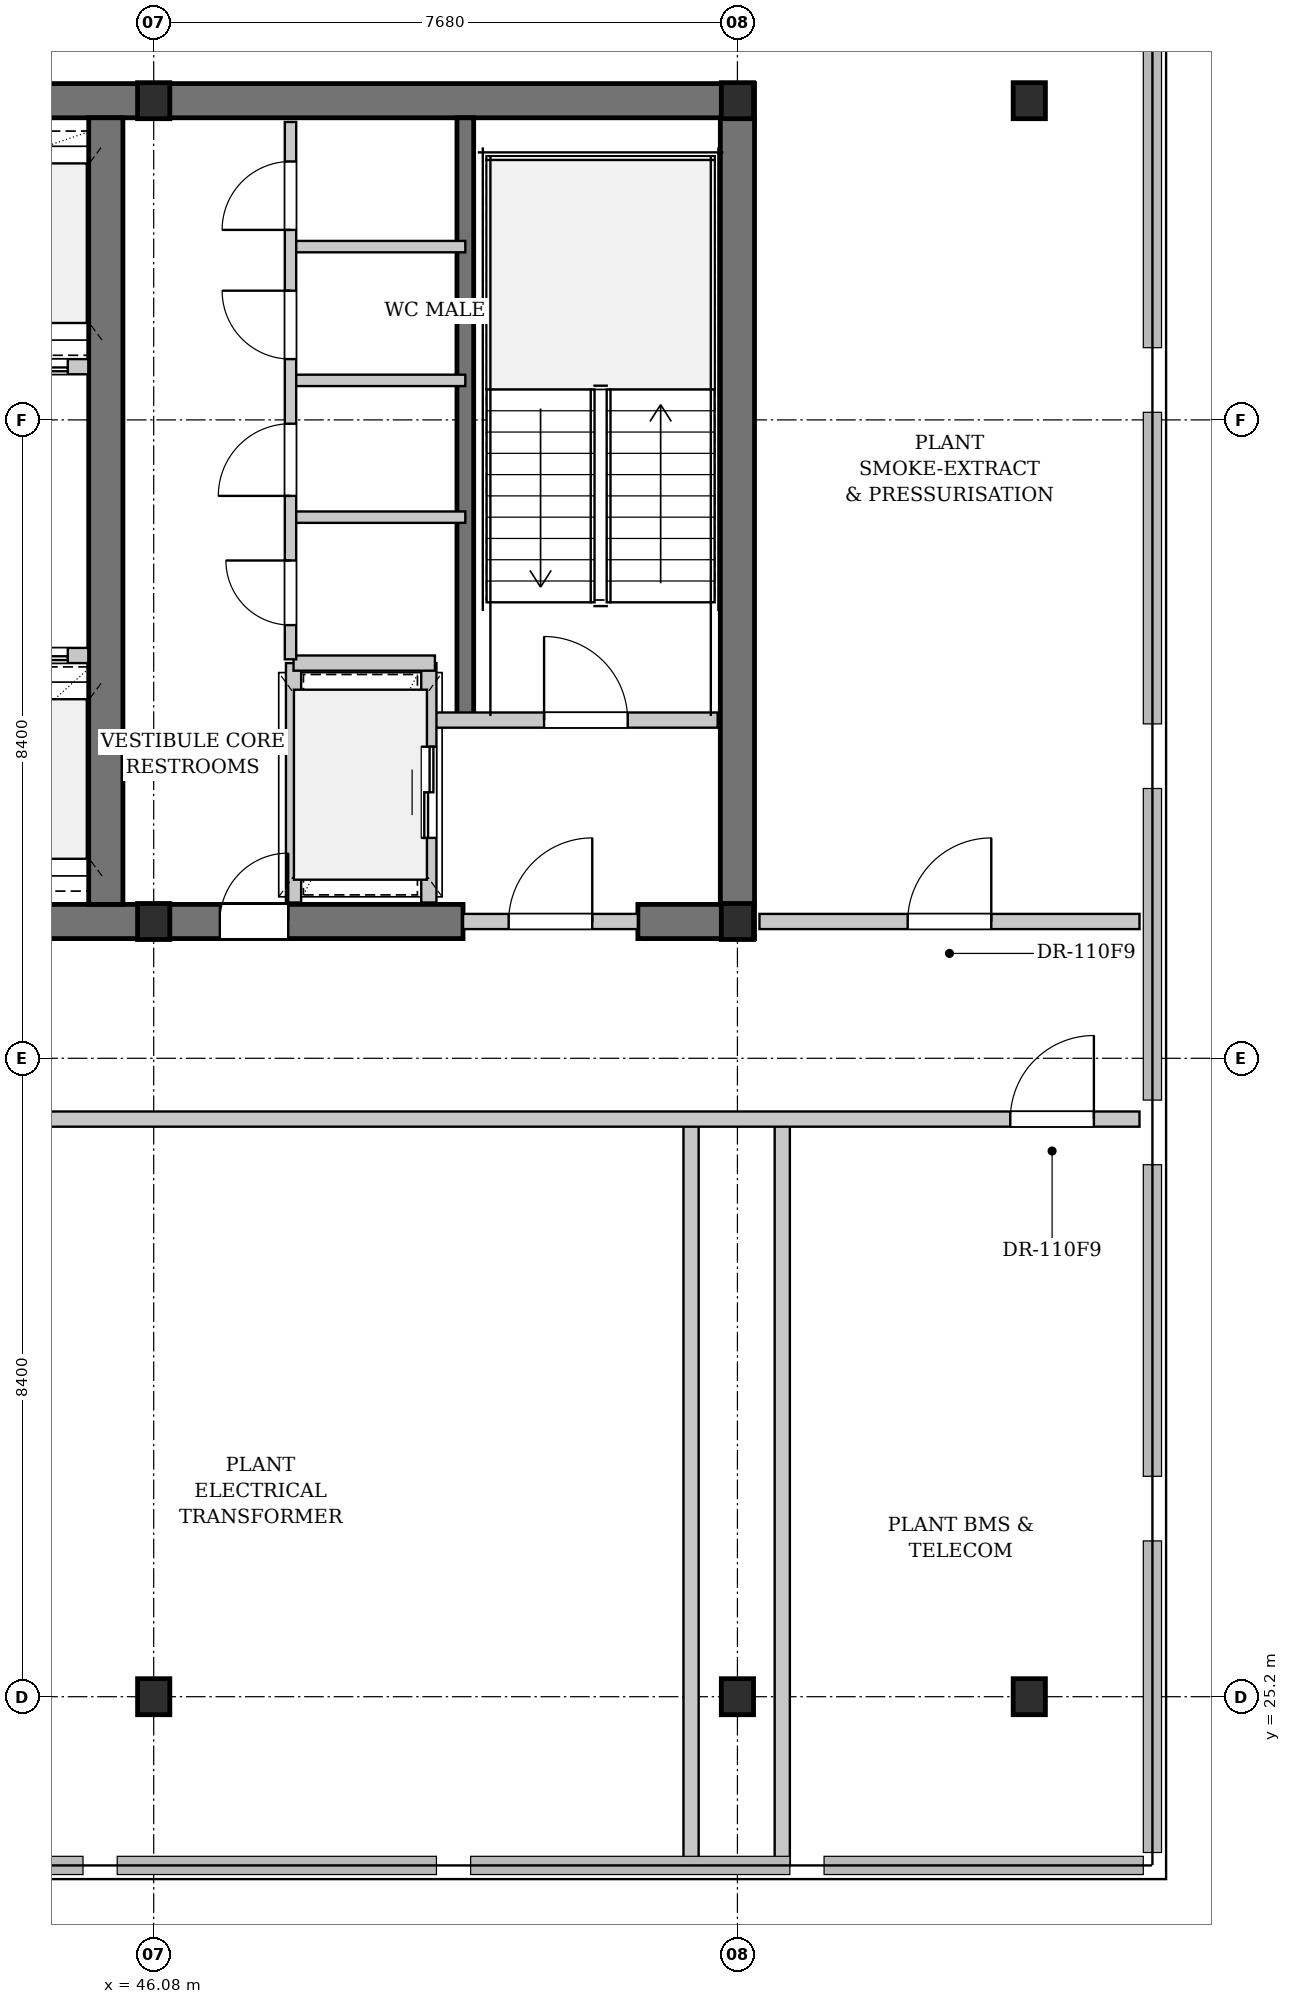
"""IFC4 building model, lengths in metres.
Left out: names, types, materials, properties, quantities, classifications, styles, units other than length and angle.
Written with IfcOpenShell. Run it as: python <this file> out.ifc"""

import sys

from ifc_helpers import new_model, si_unit, direction, frame, frame_2d, origin, origin_2d, place, context, subcontext, project, spatial, rectangle, i_section, extrude, element, fill, save


model = new_model("IFC4")
c1 = context("Model", 3, precision=1e-05, world=origin(), true_north=direction((0.0, 1.0)))
c2 = subcontext(c1, "Body", "Model", "MODEL_VIEW")
j1 = project(units=[si_unit("LENGTHUNIT", "METRE"), si_unit("PLANEANGLEUNIT", "RADIAN")], contexts=[c1])
p1 = place(None, origin())
s1 = spatial("IfcSite", under=j1, at=p1, CompositionType="ELEMENT")
p2 = place(p1, origin())
s2 = spatial("IfcBuilding", under=s1, at=p2, CompositionType="ELEMENT")
p3 = place(p2, frame((0.0, 0.0, 141.2)))
s3 = spatial("IfcBuildingStorey", under=s2, at=p3, CompositionType="ELEMENT", Elevation=141.2)
p4 = place(p3, frame((22.815, 46.2, 0.0), z_axis=(0.0, 0.0, 1.0), x_axis=(1.0, 0.0, 0.0)))
e1 = element("IfcWall", 1, at=p4, inside=s3, PredefinedType="SHEAR", context=c2, shape_type="SweptSolid", body=[
    extrude(rectangle(XDim=31.17, YDim=0.45, at=frame_2d((15.585, 0.0))), origin(), (0.0, 0.0, 1.0), 3.48),
])
p5 = place(p3, frame((42.1, 35.4, 0.0), z_axis=(0.0, 0.0, 1.0), x_axis=(1.0, 0.0, 0.0)))
e2 = element("IfcWall", 2, at=p5, inside=s3, PredefinedType="SHEAR", context=c2, shape_type="SweptSolid", body=[
    extrude(rectangle(XDim=8.05, YDim=0.45, at=frame_2d((4.025, 0.0))), origin(), (0.0, 0.0, 1.0), 3.48),
])
p6 = place(p5, frame((4.85, 0.0, 0.0)))
e3 = element("IfcOpeningElement", 3, at=p6, cuts=e2, PredefinedType="OPENING", context=c2, shape_type="SweptSolid", body=[
    extrude(rectangle(XDim=0.9, YDim=2.15, at=frame_2d((0.45, 1.075))), frame((0.0, 0.235, 0.0), z_axis=(0.0, -1.0, 0.0), x_axis=(1.0, 0.0, 0.0)), (0.0, 0.0, 1.0), 0.47),
])
p7 = place(p3, frame((52.45, 35.4, 0.0), z_axis=(0.0, 0.0, 1.0), x_axis=(1.0, 0.0, 0.0)))
e4 = element("IfcWall", 4, at=p7, inside=s3, PredefinedType="SHEAR", context=c2, shape_type="SweptSolid", body=[
    extrude(rectangle(XDim=1.535, YDim=0.45, at=frame_2d((0.768, 0.0))), origin(), (0.0, 0.0, 1.0), 3.48),
])
for number, where, z_axis, x_axis in (
    (5, (45.45, 35.625, 0.0), (0.0, 0.0, 1.0), (0.0, 1.0, 0.0)),
    (6, (53.76, 35.625, 0.0), (0.0, 0.0, 1.0), (0.0, 1.0, 0.0)),
):
    element("IfcWall", number, at=place(p3, frame(where, z_axis=z_axis, x_axis=x_axis)), inside=s3, PredefinedType="SHEAR", context=c2, shape_type="SweptSolid", body=[
        extrude(rectangle(XDim=10.35, YDim=0.45, at=frame_2d((5.175, 0.0))), origin(), (0.0, 0.0, 1.0), 3.48),
    ])
p8 = place(p3, frame((50.18, 38.05, 0.0), z_axis=(0.0, 0.0, 1.0), x_axis=(0.0, 1.0, 0.0)))
e7 = element("IfcWall", 7, at=p8, inside=s3, PredefinedType="SHEAR", context=c2, shape_type="SweptSolid", body=[
    extrude(rectangle(XDim=7.925, YDim=0.22, at=frame_2d((3.962, 0.0))), origin(), (0.0, 0.0, 1.0), 3.48),
])
for number, where, z_axis, x_axis in (
    (8, (46.08, 35.4, 0.0), (0.0, 0.0, 1.0), (1.0, 0.0, 0.0)),
    (9, (46.08, 46.2, 0.0), (0.0, 0.0, 1.0), (1.0, 0.0, 0.0)),
    (10, (46.08, 25.2, 0.0), (0.0, 0.0, 1.0), (1.0, 0.0, 0.0)),
    (11, (53.76, 35.4, 0.0), (0.0, 0.0, 1.0), (1.0, 0.0, 0.0)),
    (12, (53.76, 46.2, 0.0), (0.0, 0.0, 1.0), (1.0, 0.0, 0.0)),
    (13, (53.76, 25.2, 0.0), (0.0, 0.0, 1.0), (1.0, 0.0, 0.0)),
    (14, (57.6, 25.2, 0.0), (0.0, 0.0, 1.0), (1.0, 0.0, 0.0)),
    (15, (57.6, 46.2, 0.0), (0.0, 0.0, 1.0), (1.0, 0.0, 0.0)),
):
    element("IfcColumn", number, at=place(p3, frame(where, z_axis=z_axis, x_axis=x_axis)), inside=s3, PredefinedType="COLUMN", context=c2, shape_type="SweptSolid", body=[
        extrude(i_section(OverallWidth=0.424, OverallDepth=0.474, WebThickness=0.047, FlangeThickness=0.077, FilletRadius=0.015, at=origin_2d()), origin(), (0.0, 0.0, 1.0), 3.9),
    ])
p9 = place(p3, frame((41.85, 38.9, 0.0), z_axis=(0.0, 0.0, 1.0), x_axis=(1.0, 0.0, 0.0)))
e16 = element("IfcWall", 16, at=p9, inside=s3, PredefinedType="PARTITIONING", context=c2, shape_type="SweptSolid", body=[
    extrude(rectangle(XDim=3.37, YDim=0.2, at=frame_2d((1.685, 0.0))), origin(), (0.0, 0.0, 1.0), 3.48),
])
p10 = place(p9, frame((0.4, 0.0, 0.0)))
e17 = element("IfcOpeningElement", 17, at=p10, cuts=e16, PredefinedType="OPENING", context=c2, shape_type="SweptSolid", body=[
    extrude(rectangle(XDim=1.0, YDim=2.2, at=frame_2d((0.5, 1.1))), frame((0.0, 0.11, 0.0), z_axis=(0.0, -1.0, 0.0), x_axis=(1.0, 0.0, 0.0)), (0.0, 0.0, 1.0), 0.22),
])
p11 = place(p9, frame((2.1, 0.0, 0.0)))
e18 = element("IfcOpeningElement", 18, at=p11, cuts=e16, PredefinedType="OPENING", context=c2, shape_type="SweptSolid", body=[
    extrude(rectangle(XDim=1.0, YDim=2.2, at=frame_2d((0.5, 1.1))), frame((0.0, 0.11, 0.0), z_axis=(0.0, -1.0, 0.0), x_axis=(1.0, 0.0, 0.0)), (0.0, 0.0, 1.0), 0.22),
])
p12 = place(p3, frame((41.85, 42.7, 0.0), z_axis=(0.0, 0.0, 1.0), x_axis=(1.0, 0.0, 0.0)))
e19 = element("IfcWall", 19, at=p12, inside=s3, PredefinedType="PARTITIONING", context=c2, shape_type="SweptSolid", body=[
    extrude(rectangle(XDim=3.37, YDim=0.2, at=frame_2d((1.685, 0.0))), origin(), (0.0, 0.0, 1.0), 3.48),
])
p13 = place(p12, frame((0.4, 0.0, 0.0)))
e20 = element("IfcOpeningElement", 20, at=p13, cuts=e19, PredefinedType="OPENING", context=c2, shape_type="SweptSolid", body=[
    extrude(rectangle(XDim=1.0, YDim=2.2, at=frame_2d((0.5, 1.1))), frame((0.0, 0.11, 0.0), z_axis=(0.0, -1.0, 0.0), x_axis=(1.0, 0.0, 0.0)), (0.0, 0.0, 1.0), 0.22),
])
p14 = place(p12, frame((2.1, 0.0, 0.0)))
e21 = element("IfcOpeningElement", 21, at=p14, cuts=e19, PredefinedType="OPENING", context=c2, shape_type="SweptSolid", body=[
    extrude(rectangle(XDim=1.0, YDim=2.2, at=frame_2d((0.5, 1.1))), frame((0.0, 0.11, 0.0), z_axis=(0.0, -1.0, 0.0), x_axis=(1.0, 0.0, 0.0)), (0.0, 0.0, 1.0), 0.22),
])
p15 = place(p3, frame((49.78, 38.05, 0.0), z_axis=(0.0, 0.0, 1.0), x_axis=(1.0, 0.0, 0.0)))
e22 = element("IfcWall", 22, at=p15, inside=s3, PredefinedType="PARTITIONING", context=c2, shape_type="SweptSolid", body=[
    extrude(rectangle(XDim=3.72, YDim=0.2, at=frame_2d((1.86, 0.0))), origin(), (0.0, 0.0, 1.0), 3.48),
])
p16 = place(p15, frame((1.436, 0.0, 0.0)))
e23 = element("IfcOpeningElement", 23, at=p16, cuts=e22, PredefinedType="OPENING", context=c2, shape_type="SweptSolid", body=[
    extrude(rectangle(XDim=1.1, YDim=2.15, at=frame_2d((0.55, 1.075))), frame((0.0, 0.11, 0.0), z_axis=(0.0, -1.0, 0.0), x_axis=(1.0, 0.0, 0.0)), (0.0, 0.0, 1.0), 0.22),
])
p17 = place(p3, frame((50.15, 35.4, 0.0), z_axis=(0.0, 0.0, 1.0), x_axis=(1.0, 0.0, 0.0)))
e24 = element("IfcWall", 24, at=p17, inside=s3, PredefinedType="PARTITIONING", context=c2, shape_type="SweptSolid", body=[
    extrude(rectangle(XDim=2.3, YDim=0.2, at=frame_2d((1.15, 0.0))), origin(), (0.0, 0.0, 1.0), 2.565),
])
p18 = place(p17, frame((0.6, 0.0, 0.0)))
e25 = element("IfcOpeningElement", 25, at=p18, cuts=e24, PredefinedType="OPENING", context=c2, shape_type="SweptSolid", body=[
    extrude(rectangle(XDim=1.1, YDim=2.15, at=frame_2d((0.55, 1.075))), frame((0.0, 0.11, 0.0), z_axis=(0.0, -1.0, 0.0), x_axis=(1.0, 0.0, 0.0)), (0.0, 0.0, 1.0), 0.22),
])
p19 = place(p3, frame((49.7, 35.65, 0.0), z_axis=(0.0, 0.0, 1.0), x_axis=(0.0, 1.0, 0.0)))
e26 = element("IfcWall", 26, at=p19, inside=s3, PredefinedType="PARTITIONING", context=c2, shape_type="SweptSolid", body=[
    extrude(rectangle(XDim=3.15, YDim=0.2, at=frame_2d((1.575, 0.0))), origin(), (0.0, 0.0, 1.0), 3.48),
])
p20 = place(p19, frame((0.85, 0.0, 0.0)))
e27 = element("IfcOpeningElement", 27, at=p20, cuts=e26, PredefinedType="OPENING", context=c2, shape_type="SweptSolid", body=[
    extrude(rectangle(XDim=1.2, YDim=2.2, at=frame_2d((0.6, 1.1))), frame((0.0, 0.11, 0.0), z_axis=(0.0, -1.0, 0.0), x_axis=(1.0, 0.0, 0.0)), (0.0, 0.0, 1.0), 0.22),
])
p21 = place(p3, frame((47.92, 35.65, 0.0), z_axis=(0.0, 0.0, 1.0), x_axis=(0.0, 1.0, 0.0)))
e28 = element("IfcWall", 28, at=p21, inside=s3, PredefinedType="PARTITIONING", context=c2, shape_type="SweptSolid", body=[
    extrude(rectangle(XDim=3.15, YDim=0.2, at=frame_2d((1.575, 0.0))), origin(), (0.0, 0.0, 1.0), 3.48),
])
p22 = place(p3, frame((47.92, 38.8, 0.0), z_axis=(0.0, 0.0, 1.0), x_axis=(1.0, 0.0, 0.0)))
e29 = element("IfcWall", 29, at=p22, inside=s3, PredefinedType="PARTITIONING", context=c2, shape_type="SweptSolid", body=[
    extrude(rectangle(XDim=1.86, YDim=0.2, at=frame_2d((0.93, 0.0))), origin(), (0.0, 0.0, 1.0), 3.48),
])
for number, where, z_axis, x_axis in (
    (30, (47.88, 40.72, 0.0), (0.0, 0.0, 1.0), (1.0, 0.0, 0.0)),
    (31, (47.88, 42.52, 0.0), (0.0, 0.0, 1.0), (1.0, 0.0, 0.0)),
    (32, (47.88, 44.28, 0.0), (0.0, 0.0, 1.0), (1.0, 0.0, 0.0)),
):
    element("IfcWall", number, at=place(p3, frame(where, z_axis=z_axis, x_axis=x_axis)), inside=s3, PredefinedType="PARTITIONING", context=c2, shape_type="SweptSolid", body=[
        extrude(rectangle(XDim=2.3, YDim=0.15, at=frame_2d((1.15, 0.0))), origin(), (0.0, 0.0, 1.0), 3.48),
    ])
p23 = place(p3, frame((47.88, 38.85, 0.0), z_axis=(0.0, 0.0, 1.0), x_axis=(0.0, 1.0, 0.0)))
e33 = element("IfcWall", 33, at=p23, inside=s3, PredefinedType="PARTITIONING", context=c2, shape_type="SweptSolid", body=[
    extrude(rectangle(XDim=7.07, YDim=0.15, at=frame_2d((3.535, 0.0))), origin(), (0.0, 0.0, 1.0), 3.48),
])
p24 = place(p23, frame((0.45, 0.0, 0.0)))
e34 = element("IfcOpeningElement", 34, at=p24, cuts=e33, PredefinedType="OPENING", context=c2, shape_type="SweptSolid", body=[
    extrude(rectangle(XDim=0.85, YDim=2.15, at=frame_2d((0.425, 1.075))), frame((0.0, 0.085, 0.0), z_axis=(0.0, -1.0, 0.0), x_axis=(1.0, 0.0, 0.0)), (0.0, 0.0, 1.0), 0.17),
])
p25 = place(p23, frame((2.15, 0.0, 0.0)))
e35 = element("IfcOpeningElement", 35, at=p25, cuts=e33, PredefinedType="OPENING", context=c2, shape_type="SweptSolid", body=[
    extrude(rectangle(XDim=0.95, YDim=2.15, at=frame_2d((0.475, 1.075))), frame((0.0, 0.085, 0.0), z_axis=(0.0, -1.0, 0.0), x_axis=(1.0, 0.0, 0.0)), (0.0, 0.0, 1.0), 0.17),
])
p26 = place(p23, frame((3.95, 0.0, 0.0)))
e36 = element("IfcOpeningElement", 36, at=p26, cuts=e33, PredefinedType="OPENING", context=c2, shape_type="SweptSolid", body=[
    extrude(rectangle(XDim=0.9, YDim=2.15, at=frame_2d((0.45, 1.075))), frame((0.0, 0.085, 0.0), z_axis=(0.0, -1.0, 0.0), x_axis=(1.0, 0.0, 0.0)), (0.0, 0.0, 1.0), 0.17),
])
p27 = place(p23, frame((5.65, 0.0, 0.0)))
e37 = element("IfcOpeningElement", 37, at=p27, cuts=e33, PredefinedType="OPENING", context=c2, shape_type="SweptSolid", body=[
    extrude(rectangle(XDim=0.9, YDim=2.15, at=frame_2d((0.45, 1.075))), frame((0.0, 0.085, 0.0), z_axis=(0.0, -1.0, 0.0), x_axis=(1.0, 0.0, 0.0)), (0.0, 0.0, 1.0), 0.17),
])
p28 = place(p3, frame((54.05, 35.4, 0.0), z_axis=(0.0, 0.0, 1.0), x_axis=(1.0, 0.0, 0.0)))
e38 = element("IfcWall", 38, at=p28, inside=s3, PredefinedType="PARTITIONING", context=c2, shape_type="SweptSolid", body=[
    extrude(rectangle(XDim=5.0, YDim=0.2, at=frame_2d((2.5, 0.0))), origin(), (0.0, 0.0, 1.0), 3.48),
])
p29 = place(p28, frame((1.95, 0.0, 0.0)))
e39 = element("IfcOpeningElement", 39, at=p29, cuts=e38, PredefinedType="OPENING", context=c2, shape_type="SweptSolid", body=[
    extrude(rectangle(XDim=1.1, YDim=2.15, at=frame_2d((0.55, 1.075))), frame((0.0, 0.11, 0.0), z_axis=(0.0, -1.0, 0.0), x_axis=(1.0, 0.0, 0.0)), (0.0, 0.0, 1.0), 0.22),
])
for number, where, z_axis, x_axis in (
    (40, (53.15, 22.98, 0.0), (0.0, 0.0, 1.0), (0.0, 1.0, 0.0)),
    (41, (54.35, 22.98, 0.0), (0.0, 0.0, 1.0), (0.0, 1.0, 0.0)),
):
    element("IfcWall", number, at=place(p3, frame(where, z_axis=z_axis, x_axis=x_axis)), inside=s3, PredefinedType="PARTITIONING", context=c2, shape_type="SweptSolid", body=[
        extrude(rectangle(XDim=9.82, YDim=0.2, at=frame_2d((4.91, 0.0))), origin(), (0.0, 0.0, 1.0), 3.48),
    ])
p30 = place(p3, frame((17.75, 32.8, 0.0), z_axis=(0.0, 0.0, 1.0), x_axis=(1.0, 0.0, 0.0)))
e42 = element("IfcWall", 42, at=p30, inside=s3, PredefinedType="PARTITIONING", context=c2, shape_type="SweptSolid", body=[
    extrude(rectangle(XDim=41.3, YDim=0.2, at=frame_2d((20.65, 0.0))), origin(), (0.0, 0.0, 1.0), 3.48),
])
p31 = place(p30, frame((0.6, 0.0, 0.0)))
e43 = element("IfcOpeningElement", 43, at=p31, cuts=e42, PredefinedType="OPENING", context=c2, shape_type="SweptSolid", body=[
    extrude(rectangle(XDim=1.1, YDim=2.15, at=frame_2d((0.55, 1.075))), frame((0.0, 0.11, 0.0), z_axis=(0.0, -1.0, 0.0), x_axis=(1.0, 0.0, 0.0)), (0.0, 0.0, 1.0), 0.22),
])
p32 = place(p30, frame((16.244, 0.0, 0.0)))
e44 = element("IfcOpeningElement", 44, at=p32, cuts=e42, PredefinedType="OPENING", context=c2, shape_type="SweptSolid", body=[
    extrude(rectangle(XDim=1.1, YDim=2.15, at=frame_2d((0.55, 1.075))), frame((0.0, 0.11, 0.0), z_axis=(0.0, -1.0, 0.0), x_axis=(1.0, 0.0, 0.0)), (0.0, 0.0, 1.0), 0.22),
])
p33 = place(p30, frame((23.945, 0.0, 0.0)))
e45 = element("IfcOpeningElement", 45, at=p33, cuts=e42, PredefinedType="OPENING", context=c2, shape_type="SweptSolid", body=[
    extrude(rectangle(XDim=1.1, YDim=2.15, at=frame_2d((0.55, 1.075))), frame((0.0, 0.11, 0.0), z_axis=(0.0, -1.0, 0.0), x_axis=(1.0, 0.0, 0.0)), (0.0, 0.0, 1.0), 0.22),
])
p34 = place(p30, frame((39.6, 0.0, 0.0)))
e46 = element("IfcOpeningElement", 46, at=p34, cuts=e42, PredefinedType="OPENING", context=c2, shape_type="SweptSolid", body=[
    extrude(rectangle(XDim=1.1, YDim=2.15, at=frame_2d((0.55, 1.075))), frame((0.0, 0.11, 0.0), z_axis=(0.0, -1.0, 0.0), x_axis=(1.0, 0.0, 0.0)), (0.0, 0.0, 1.0), 0.22),
])
p35 = place(p11, origin())
e47 = element("IfcDoor", 47, at=p35, inside=s3, OperationType="DOUBLE_DOOR_SLIDING", PredefinedType="DOOR", context=c2, shape_type="SweptSolid", body=[
    extrude(rectangle(XDim=1.0, YDim=2.2, at=frame_2d((0.5, 1.1))), frame((0.0, 0.025, 0.0), z_axis=(0.0, -1.0, 0.0), x_axis=(1.0, 0.0, 0.0)), (0.0, 0.0, 1.0), 0.05),
])
fill(e18, e47)
p36 = place(p14, origin())
e48 = element("IfcDoor", 48, at=p36, inside=s3, OperationType="DOUBLE_DOOR_SLIDING", PredefinedType="DOOR", context=c2, shape_type="SweptSolid", body=[
    extrude(rectangle(XDim=1.0, YDim=2.2, at=frame_2d((0.5, 1.1))), frame((0.0, 0.025, 0.0), z_axis=(0.0, -1.0, 0.0), x_axis=(1.0, 0.0, 0.0)), (0.0, 0.0, 1.0), 0.05),
])
fill(e21, e48)
p37 = place(p16, origin())
e49 = element("IfcDoor", 49, at=p37, inside=s3, OperationType="SINGLE_SWING_LEFT", PredefinedType="DOOR", context=c2, shape_type="SweptSolid", body=[
    extrude(rectangle(XDim=1.1, YDim=2.15, at=frame_2d((0.55, 1.075))), frame((0.0, 0.025, 0.0), z_axis=(0.0, -1.0, 0.0), x_axis=(1.0, 0.0, 0.0)), (0.0, 0.0, 1.0), 0.05),
])
fill(e23, e49)
p38 = place(p18, origin())
e50 = element("IfcDoor", 50, at=p38, inside=s3, OperationType="SINGLE_SWING_RIGHT", PredefinedType="DOOR", context=c2, shape_type="SweptSolid", body=[
    extrude(rectangle(XDim=1.1, YDim=2.15, at=frame_2d((0.55, 1.075))), frame((0.0, 0.025, 0.0), z_axis=(0.0, -1.0, 0.0), x_axis=(1.0, 0.0, 0.0)), (0.0, 0.0, 1.0), 0.05),
])
fill(e25, e50)
p39 = place(p20, origin())
e51 = element("IfcDoor", 51, at=p39, inside=s3, OperationType="DOUBLE_DOOR_SLIDING", PredefinedType="DOOR", context=c2, shape_type="SweptSolid", body=[
    extrude(rectangle(XDim=1.2, YDim=2.2, at=frame_2d((0.6, 1.1))), frame((0.0, 0.025, 0.0), z_axis=(0.0, -1.0, 0.0), x_axis=(1.0, 0.0, 0.0)), (0.0, 0.0, 1.0), 0.05),
])
fill(e27, e51)
p40 = place(p24, origin())
e52 = element("IfcDoor", 52, at=p40, inside=s3, OperationType="SINGLE_SWING_RIGHT", PredefinedType="DOOR", context=c2, shape_type="SweptSolid", body=[
    extrude(rectangle(XDim=0.85, YDim=2.15, at=frame_2d((0.425, 1.075))), frame((0.0, 0.025, 0.0), z_axis=(0.0, -1.0, 0.0), x_axis=(1.0, 0.0, 0.0)), (0.0, 0.0, 1.0), 0.05),
])
fill(e34, e52)
p41 = place(p25, origin())
e53 = element("IfcDoor", 53, at=p41, inside=s3, OperationType="SINGLE_SWING_LEFT", PredefinedType="DOOR", context=c2, shape_type="SweptSolid", body=[
    extrude(rectangle(XDim=0.95, YDim=2.15, at=frame_2d((0.475, 1.075))), frame((0.0, 0.025, 0.0), z_axis=(0.0, -1.0, 0.0), x_axis=(1.0, 0.0, 0.0)), (0.0, 0.0, 1.0), 0.05),
])
fill(e35, e53)
p42 = place(p26, origin())
e54 = element("IfcDoor", 54, at=p42, inside=s3, OperationType="SINGLE_SWING_RIGHT", PredefinedType="DOOR", context=c2, shape_type="SweptSolid", body=[
    extrude(rectangle(XDim=0.9, YDim=2.15, at=frame_2d((0.45, 1.075))), frame((0.0, 0.025, 0.0), z_axis=(0.0, -1.0, 0.0), x_axis=(1.0, 0.0, 0.0)), (0.0, 0.0, 1.0), 0.05),
])
fill(e36, e54)
p43 = place(p27, origin())
e55 = element("IfcDoor", 55, at=p43, inside=s3, OperationType="SINGLE_SWING_LEFT", PredefinedType="DOOR", context=c2, shape_type="SweptSolid", body=[
    extrude(rectangle(XDim=0.9, YDim=2.15, at=frame_2d((0.45, 1.075))), frame((0.0, 0.025, 0.0), z_axis=(0.0, -1.0, 0.0), x_axis=(1.0, 0.0, 0.0)), (0.0, 0.0, 1.0), 0.05),
])
fill(e37, e55)
p44 = place(p29, origin())
e56 = element("IfcDoor", 56, at=p44, inside=s3, OperationType="SINGLE_SWING_RIGHT", PredefinedType="DOOR", context=c2, shape_type="SweptSolid", body=[
    extrude(rectangle(XDim=1.1, YDim=2.15, at=frame_2d((0.55, 1.075))), frame((0.0, 0.025, 0.0), z_axis=(0.0, -1.0, 0.0), x_axis=(1.0, 0.0, 0.0)), (0.0, 0.0, 1.0), 0.05),
])
fill(e39, e56)
p45 = place(p34, origin())
e57 = element("IfcDoor", 57, at=p45, inside=s3, OperationType="SINGLE_SWING_RIGHT", PredefinedType="DOOR", context=c2, shape_type="SweptSolid", body=[
    extrude(rectangle(XDim=1.1, YDim=2.15, at=frame_2d((0.55, 1.075))), frame((0.0, 0.025, 0.0), z_axis=(0.0, -1.0, 0.0), x_axis=(1.0, 0.0, 0.0)), (0.0, 0.0, 1.0), 0.05),
])
fill(e46, e57)
p46 = place(p6, origin())
e58 = element("IfcDoor", 58, at=p46, inside=s3, OperationType="SINGLE_SWING_RIGHT", PredefinedType="DOOR", context=c2, shape_type="SweptSolid", body=[
    extrude(rectangle(XDim=0.9, YDim=2.15, at=frame_2d((0.45, 1.075))), frame((0.0, 0.025, 0.0), z_axis=(0.0, -1.0, 0.0), x_axis=(1.0, 0.0, 0.0)), (0.0, 0.0, 1.0), 0.05),
])
fill(e3, e58)
save(model, sys.argv[1])
